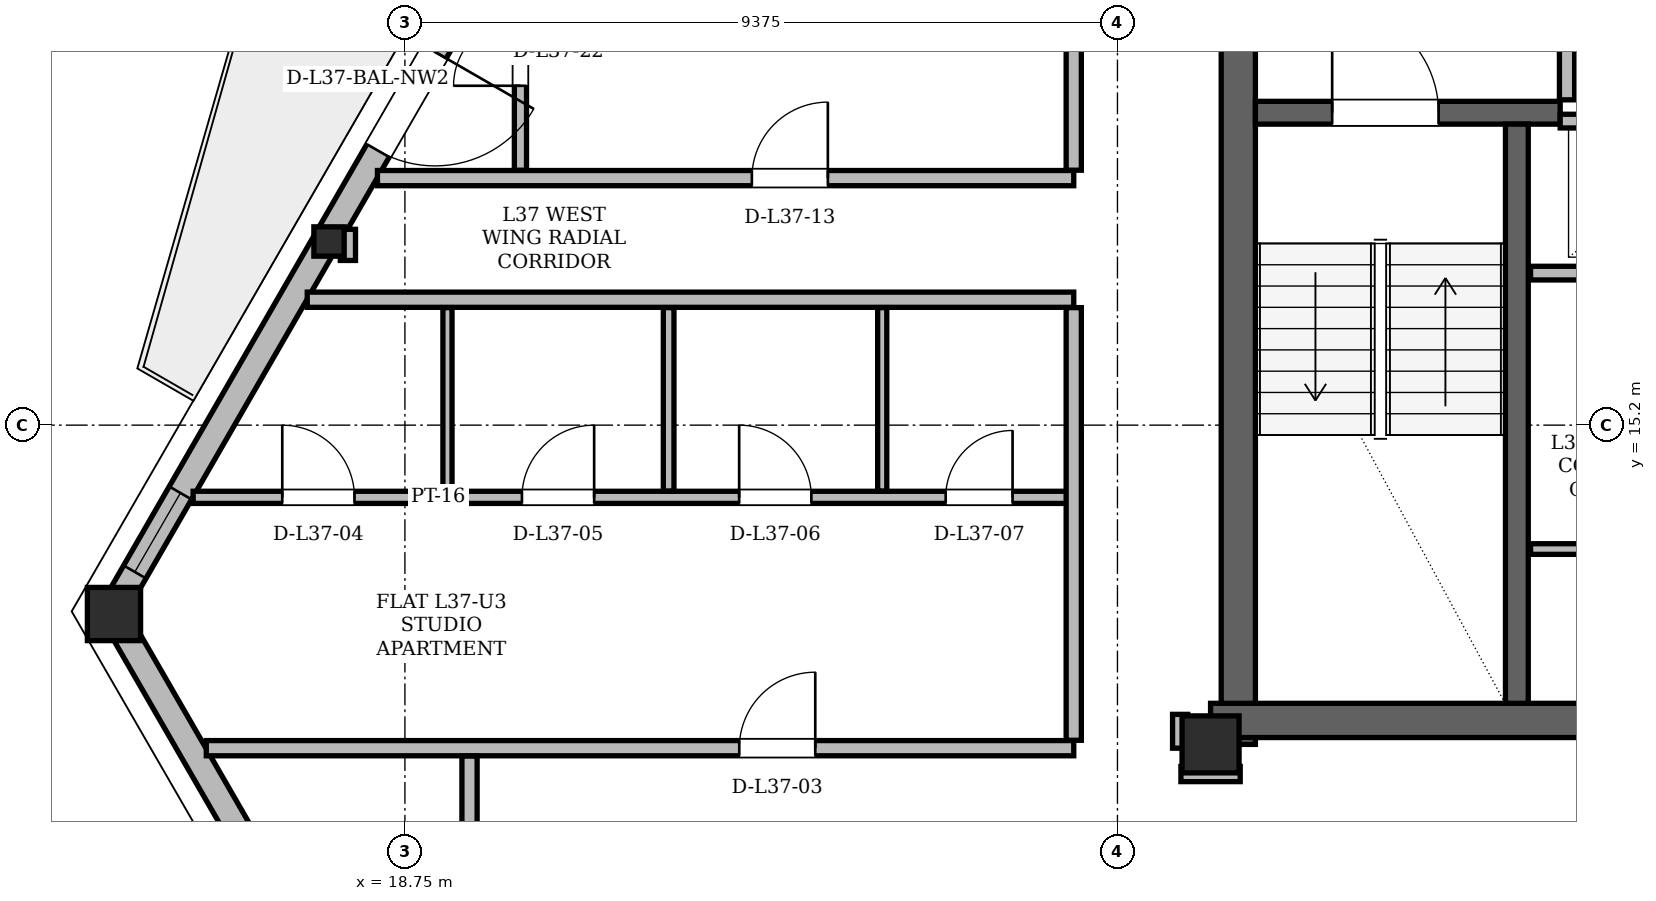
"""IFC4 building model, lengths in metres.
Left out: names, types, materials, properties, quantities, classifications, styles, units other than length and angle.
Written with IfcOpenShell. Run it as: python <this file> out.ifc"""

import sys

from ifc_helpers import new_model, si_unit, direction, frame, frame_2d, origin, origin_2d, place, context, subcontext, project, spatial, rectangle, hollow_rectangle, i_section, extrude, element, fill, save


model = new_model("IFC4")
c1 = context("Model", 3, precision=1e-05, world=origin(), true_north=direction((0.0, 1.0)))
c2 = subcontext(c1, "Body", "Model", "MODEL_VIEW")
j1 = project(units=[si_unit("LENGTHUNIT", "METRE"), si_unit("PLANEANGLEUNIT", "RADIAN")], contexts=[c1])
p1 = place(None, origin())
s1 = spatial("IfcSite", under=j1, at=p1, CompositionType="ELEMENT")
p2 = place(p1, origin())
s2 = spatial("IfcBuilding", under=s1, at=p2, CompositionType="ELEMENT")
p3 = place(p2, frame((0.0, 0.0, 142.2)))
s3 = spatial("IfcBuildingStorey", under=s2, at=p3, CompositionType="ELEMENT", Elevation=142.2)
p4 = place(p3, frame((29.35, 11.0, 0.0), z_axis=(0.0, 0.0, 1.0), x_axis=(1.0, 0.0, 0.0)))
e1 = element("IfcColumn", 1, at=p4, inside=s3, PredefinedType="COLUMN", context=c2, shape_type="SweptSolid", body=[
    extrude(hollow_rectangle(XDim=0.75, YDim=0.75, WallThickness=0.06, at=origin_2d()), origin(), (0.0, 0.0, 1.0), 3.6),
])
p5 = place(p3, frame((14.897, 12.75, 0.005), z_axis=(0.014137914748, -0.01930369129, 0.999713702451), x_axis=(0.806766093747, 0.590870941899, 0.0)))
e2 = element("IfcColumn", 2, at=p5, inside=s3, PredefinedType="COLUMN", context=c2, shape_type="SweptSolid", body=[
    extrude(hollow_rectangle(XDim=0.7, YDim=0.7, WallThickness=0.055, at=origin_2d()), origin(), (0.0, 0.0, 1.0), 3.592),
])
p6 = place(p3, frame((17.723, 17.646, 0.005), z_axis=(0.015701641679, -0.016585283852, 0.999739159385), x_axis=(0.72618726002, 0.687496955183, 0.0)))
e3 = element("IfcColumn", 3, at=p6, inside=s3, PredefinedType="COLUMN", context=c2, shape_type="SweptSolid", body=[
    extrude(i_section(OverallWidth=0.399, OverallDepth=0.386, WebThickness=0.021, FlangeThickness=0.033, at=origin_2d()), origin(), (0.0, 0.0, 1.0), 3.592),
])
p7 = place(p3, frame((29.715, 11.0, 0.0), z_axis=(0.0, 0.0, 1.0), x_axis=(0.0, 1.0, 0.0)))
e4 = element("IfcWall", 4, at=p7, inside=s3, PredefinedType="SHEAR", context=c2, shape_type="SweptSolid", body=[
    extrude(rectangle(XDim=13.3, YDim=0.45, at=frame_2d((6.65, 0.0))), origin(), (0.0, 0.0, 1.0), 3.36),
])
p8 = place(p3, frame((29.35, 11.315, 0.0), z_axis=(0.0, 0.0, 1.0), x_axis=(1.0, 0.0, 0.0)))
e5 = element("IfcWall", 5, at=p8, inside=s3, PredefinedType="SHEAR", context=c2, shape_type="SweptSolid", body=[
    extrude(rectangle(XDim=7.1, YDim=0.45, at=frame_2d((3.55, 0.0))), origin(), (0.0, 0.0, 1.0), 3.36),
])
p9 = place(p3, frame((29.94, 19.31, 0.0), z_axis=(0.0, 0.0, 1.0), x_axis=(1.0, 0.0, 0.0)))
e6 = element("IfcWall", 6, at=p9, inside=s3, PredefinedType="SHEAR", context=c2, shape_type="SweptSolid", body=[
    extrude(rectangle(XDim=4.01, YDim=0.3, at=frame_2d((2.005, 0.0))), origin(), (0.0, 0.0, 1.0), 3.36),
])
p10 = place(p9, frame((1.01, 0.0, 0.0)))
e7 = element("IfcOpeningElement", 7, at=p10, cuts=e6, PredefinedType="OPENING", context=c2, shape_type="SweptSolid", body=[
    extrude(rectangle(XDim=1.4, YDim=2.2, at=frame_2d((0.7, 1.1))), frame((0.0, 0.15, 0.0), z_axis=(0.0, -1.0, 0.0), x_axis=(1.0, 0.0, 0.0)), (0.0, 0.0, 1.0), 0.3),
])
p11 = place(p3, frame((33.38, 11.54, 0.0), z_axis=(0.0, 0.0, 1.0), x_axis=(0.0, 1.0, 0.0)))
e8 = element("IfcWall", 8, at=p11, inside=s3, PredefinedType="SHEAR", context=c2, shape_type="SweptSolid", body=[
    extrude(rectangle(XDim=7.62, YDim=0.3, at=frame_2d((3.81, 0.0))), origin(), (0.0, 0.0, 1.0), 3.36),
])
p12 = place(p3, frame((14.897, 12.75, 0.0), z_axis=(0.0, 0.0, 1.0), x_axis=(0.500014298586, -0.866017148335, 0.0)))
e9 = element("IfcWall", 9, at=p12, inside=s3, PredefinedType="SOLIDWALL", context=c2, shape_type="SweptSolid", body=[
    extrude(rectangle(XDim=9.872, YDim=0.34, at=frame_2d((4.936, 0.0))), origin(), (0.0, 0.0, 1.0), 2.58),
])
p13 = place(p3, frame((32.564, 43.35, 0.0), z_axis=(0.0, 0.0, 1.0), x_axis=(-0.500002563111, -0.866023923966, 0.0)))
e10 = element("IfcWall", 10, at=p13, inside=s3, PredefinedType="SOLIDWALL", context=c2, shape_type="SweptSolid", body=[
    extrude(rectangle(XDim=35.334, YDim=0.34, at=frame_2d((17.667, 0.0))), origin(), (0.0, 0.0, 1.0), 2.58),
])
p14 = place(p13, frame((8.034, 0.0, 0.0)))
e11 = element("IfcOpeningElement", 11, at=p14, cuts=e10, PredefinedType="OPENING", context=c2, shape_type="SweptSolid", body=[
    extrude(rectangle(XDim=1.5, YDim=2.2, at=frame_2d((0.75, 1.1))), frame((0.0, 0.17, 0.0), z_axis=(0.0, -1.0, 0.0), x_axis=(1.0, 0.0, 0.0)), (0.0, 0.0, 1.0), 0.34),
])
p15 = place(p13, frame((26.835, 0.0, 0.0)))
e12 = element("IfcOpeningElement", 12, at=p15, cuts=e10, PredefinedType="OPENING", context=c2, shape_type="SweptSolid", body=[
    extrude(rectangle(XDim=1.5, YDim=2.2, at=frame_2d((0.75, 1.1))), frame((0.0, 0.17, 0.0), z_axis=(0.0, -1.0, 0.0), x_axis=(1.0, 0.0, 0.0)), (0.0, 0.0, 1.0), 0.34),
])
p16 = place(p13, frame((22.185, 0.0, 0.85)))
e13 = element("IfcOpeningElement", 13, at=p16, cuts=e10, PredefinedType="OPENING", context=c2, shape_type="SweptSolid", body=[
    extrude(rectangle(XDim=1.2, YDim=1.48, at=frame_2d((0.6, 0.74))), frame((0.0, 0.17, 0.0), z_axis=(0.0, -1.0, 0.0), x_axis=(1.0, 0.0, 0.0)), (0.0, 0.0, 1.0), 0.34),
])
p17 = place(p13, frame((2.318, 0.0, 0.85)))
e14 = element("IfcOpeningElement", 14, at=p17, cuts=e10, PredefinedType="OPENING", context=c2, shape_type="SweptSolid", body=[
    extrude(rectangle(XDim=1.6, YDim=1.62, at=frame_2d((0.8, 0.81))), frame((0.0, 0.17, 0.0), z_axis=(0.0, -1.0, 0.0), x_axis=(1.0, 0.0, 0.0)), (0.0, 0.0, 1.0), 0.34),
])
p18 = place(p13, frame((12.959, 0.0, 0.85)))
e15 = element("IfcOpeningElement", 15, at=p18, cuts=e10, PredefinedType="OPENING", context=c2, shape_type="SweptSolid", body=[
    extrude(rectangle(XDim=3.0, YDim=1.62, at=frame_2d((1.5, 0.81))), frame((0.0, 0.17, 0.0), z_axis=(0.0, -1.0, 0.0), x_axis=(1.0, 0.0, 0.0)), (0.0, 0.0, 1.0), 0.34),
])
p19 = place(p13, frame((20.293, 0.0, 0.85)))
e16 = element("IfcOpeningElement", 16, at=p19, cuts=e10, PredefinedType="OPENING", context=c2, shape_type="SweptSolid", body=[
    extrude(rectangle(XDim=1.2, YDim=1.48, at=frame_2d((0.6, 0.74))), frame((0.0, 0.17, 0.0), z_axis=(0.0, -1.0, 0.0), x_axis=(1.0, 0.0, 0.0)), (0.0, 0.0, 1.0), 0.34),
])
p20 = place(p13, frame((33.535, 0.0, 0.85)))
e17 = element("IfcOpeningElement", 17, at=p20, cuts=e10, PredefinedType="OPENING", context=c2, shape_type="SweptSolid", body=[
    extrude(rectangle(XDim=1.2, YDim=1.48, at=frame_2d((0.6, 0.74))), frame((0.0, 0.17, 0.0), z_axis=(0.0, -1.0, 0.0), x_axis=(1.0, 0.0, 0.0)), (0.0, 0.0, 1.0), 0.34),
])
p21 = place(p3, frame((34.04, 19.48, 0.0), z_axis=(0.0, 0.0, 1.0), x_axis=(0.0, 1.0, 0.0)))
e18 = element("IfcWall", 18, at=p21, inside=s3, PredefinedType="PARTITIONING", context=c2, shape_type="SweptSolid", body=[
    extrude(rectangle(XDim=4.5, YDim=0.2, at=frame_2d((2.25, 0.0))), origin(), (0.0, 0.0, 1.0), 2.4),
])
p22 = place(p21, frame((2.12, 0.0, 0.0)))
e19 = element("IfcOpeningElement", 19, at=p22, cuts=e18, PredefinedType="OPENING", context=c2, shape_type="SweptSolid", body=[
    extrude(rectangle(XDim=1.1, YDim=2.2, at=frame_2d((0.55, 1.1))), frame((0.0, 0.1, 0.0), z_axis=(0.0, -1.0, 0.0), x_axis=(1.0, 0.0, 0.0)), (0.0, 0.0, 1.0), 0.2),
])
p23 = place(p3, frame((33.95, 19.2, 0.0), z_axis=(0.0, 0.0, 1.0), x_axis=(1.0, 0.0, 0.0)))
e20 = element("IfcWall", 20, at=p23, inside=s3, PredefinedType="PARTITIONING", context=c2, shape_type="SweptSolid", body=[
    extrude(rectangle(XDim=2.27, YDim=0.18, at=frame_2d((1.135, 0.0))), origin(), (0.0, 0.0, 1.0), 3.36),
])
p24 = place(p3, frame((33.56, 17.2, 0.0), z_axis=(0.0, 0.0, 1.0), x_axis=(1.0, 0.0, 0.0)))
e21 = element("IfcWall", 21, at=p24, inside=s3, PredefinedType="PARTITIONING", context=c2, shape_type="SweptSolid", body=[
    extrude(rectangle(XDim=2.66, YDim=0.18, at=frame_2d((1.33, 0.0))), origin(), (0.0, 0.0, 1.0), 3.36),
])
p25 = place(p3, frame((33.56, 13.57, 0.0), z_axis=(0.0, 0.0, 1.0), x_axis=(1.0, 0.0, 0.0)))
e22 = element("IfcWall", 22, at=p25, inside=s3, PredefinedType="PARTITIONING", context=c2, shape_type="SweptSolid", body=[
    extrude(rectangle(XDim=2.66, YDim=0.14, at=frame_2d((1.33, 0.0))), origin(), (0.0, 0.0, 1.0), 3.36),
])
p26 = place(p3, frame((28.96, 10.61, 0.0), z_axis=(0.0, 0.0, 1.0), x_axis=(1.0, 0.0, 0.0)))
e23 = element("IfcWall", 23, at=p26, inside=s3, PredefinedType="PARTITIONING", context=c2, shape_type="SweptSolid", body=[
    extrude(rectangle(XDim=0.78, YDim=0.2, at=frame_2d((0.39, 0.0))), origin(), (0.0, 0.0, 1.0), 2.4),
])
p27 = place(p3, frame((16.137, 10.95, 0.0), z_axis=(0.0, 0.0, 1.0), x_axis=(1.0, 0.0, 0.0)))
e24 = element("IfcWall", 24, at=p27, inside=s3, PredefinedType="PARTITIONING", context=c2, shape_type="SweptSolid", body=[
    extrude(rectangle(XDim=11.413, YDim=0.2, at=frame_2d((5.707, 0.0))), origin(), (0.0, 0.0, 1.0), 3.36),
])
p28 = place(p27, frame((7.012, 0.0, 0.0)))
e25 = element("IfcOpeningElement", 25, at=p28, cuts=e24, PredefinedType="OPENING", context=c2, shape_type="SweptSolid", body=[
    extrude(rectangle(XDim=1.0, YDim=2.18, at=frame_2d((0.5, 1.09))), frame((0.0, 0.1, 0.0), z_axis=(0.0, -1.0, 0.0), x_axis=(1.0, 0.0, 0.0)), (0.0, 0.0, 1.0), 0.2),
])
p29 = place(p3, frame((15.964, 14.25, 0.0), z_axis=(0.0, 0.0, 1.0), x_axis=(1.0, 0.0, 0.0)))
e26 = element("IfcWall", 26, at=p29, inside=s3, PredefinedType="PARTITIONING", context=c2, shape_type="SweptSolid", body=[
    extrude(rectangle(XDim=11.636, YDim=0.16, at=frame_2d((5.818, 0.0))), origin(), (0.0, 0.0, 1.0), 3.36),
])
p30 = place(p29, frame((1.173, 0.0, 0.0)))
e27 = element("IfcOpeningElement", 27, at=p30, cuts=e26, PredefinedType="OPENING", context=c2, shape_type="SweptSolid", body=[
    extrude(rectangle(XDim=0.95, YDim=2.1, at=frame_2d((0.475, 1.05))), frame((0.0, 0.08, 0.0), z_axis=(0.0, -1.0, 0.0), x_axis=(1.0, 0.0, 0.0)), (0.0, 0.0, 1.0), 0.16),
])
p31 = place(p29, frame((4.326, 0.0, 0.0)))
e28 = element("IfcOpeningElement", 28, at=p31, cuts=e26, PredefinedType="OPENING", context=c2, shape_type="SweptSolid", body=[
    extrude(rectangle(XDim=0.95, YDim=2.1, at=frame_2d((0.475, 1.05))), frame((0.0, 0.08, 0.0), z_axis=(0.0, -1.0, 0.0), x_axis=(1.0, 0.0, 0.0)), (0.0, 0.0, 1.0), 0.16),
])
p32 = place(p29, frame((7.184, 0.0, 0.0)))
e29 = element("IfcOpeningElement", 29, at=p32, cuts=e26, PredefinedType="OPENING", context=c2, shape_type="SweptSolid", body=[
    extrude(rectangle(XDim=0.95, YDim=2.1, at=frame_2d((0.475, 1.05))), frame((0.0, 0.08, 0.0), z_axis=(0.0, -1.0, 0.0), x_axis=(1.0, 0.0, 0.0)), (0.0, 0.0, 1.0), 0.16),
])
p33 = place(p29, frame((9.901, 0.0, 0.0)))
e30 = element("IfcOpeningElement", 30, at=p33, cuts=e26, PredefinedType="OPENING", context=c2, shape_type="SweptSolid", body=[
    extrude(rectangle(XDim=0.88, YDim=2.08, at=frame_2d((0.44, 1.04))), frame((0.0, 0.08, 0.0), z_axis=(0.0, -1.0, 0.0), x_axis=(1.0, 0.0, 0.0)), (0.0, 0.0, 1.0), 0.16),
])
p34 = place(p3, frame((17.465, 16.85, 0.0), z_axis=(0.0, 0.0, 1.0), x_axis=(1.0, 0.0, 0.0)))
e31 = element("IfcWall", 31, at=p34, inside=s3, PredefinedType="PARTITIONING", context=c2, shape_type="SweptSolid", body=[
    extrude(rectangle(XDim=10.085, YDim=0.2, at=frame_2d((5.042, 0.0))), origin(), (0.0, 0.0, 1.0), 3.36),
])
p35 = place(p3, frame((18.389, 18.45, 0.0), z_axis=(0.0, 0.0, 1.0), x_axis=(1.0, 0.0, 0.0)))
e32 = element("IfcWall", 32, at=p35, inside=s3, PredefinedType="PARTITIONING", context=c2, shape_type="SweptSolid", body=[
    extrude(rectangle(XDim=9.161, YDim=0.2, at=frame_2d((4.581, 0.0))), origin(), (0.0, 0.0, 1.0), 3.36),
])
p36 = place(p35, frame((4.926, 0.0, 0.0)))
e33 = element("IfcOpeningElement", 33, at=p36, cuts=e32, PredefinedType="OPENING", context=c2, shape_type="SweptSolid", body=[
    extrude(rectangle(XDim=1.0, YDim=2.18, at=frame_2d((0.5, 1.09))), frame((0.0, 0.1, 0.0), z_axis=(0.0, -1.0, 0.0), x_axis=(1.0, 0.0, 0.0)), (0.0, 0.0, 1.0), 0.2),
])
p37 = place(p3, frame((18.0, 17.367, 0.0), z_axis=(0.0, 0.0, 1.0), x_axis=(0.0, 1.0, 0.0)))
e34 = element("IfcWall", 34, at=p37, inside=s3, PredefinedType="PARTITIONING", context=c2, shape_type="SweptSolid", body=[
    extrude(rectangle(XDim=0.41, YDim=0.2, at=frame_2d((0.205, 0.0))), origin(), (0.0, 0.0, 1.0), 3.36),
])
p38 = place(p3, frame((19.31, 14.334, 0.0), z_axis=(0.0, 0.0, 1.0), x_axis=(0.0, 1.0, 0.0)))
e35 = element("IfcWall", 35, at=p38, inside=s3, PredefinedType="PARTITIONING", context=c2, shape_type="SweptSolid", body=[
    extrude(rectangle(XDim=2.412, YDim=0.12, at=frame_2d((1.206, 0.0))), origin(), (0.0, 0.0, 1.0), 3.36),
])
p39 = place(p3, frame((19.6, 9.404, 0.0), z_axis=(0.0, 0.0, 1.0), x_axis=(0.0, 1.0, 0.0)))
e36 = element("IfcWall", 36, at=p39, inside=s3, PredefinedType="PARTITIONING", context=c2, shape_type="SweptSolid", body=[
    extrude(rectangle(XDim=1.442, YDim=0.2, at=frame_2d((0.721, 0.0))), origin(), (0.0, 0.0, 1.0), 3.36),
])
p40 = place(p3, frame((20.27, 18.554, 0.0), z_axis=(0.0, 0.0, 1.0), x_axis=(0.0, 1.0, 0.0)))
e37 = element("IfcWall", 37, at=p40, inside=s3, PredefinedType="PARTITIONING", context=c2, shape_type="SweptSolid", body=[
    extrude(rectangle(XDim=3.136, YDim=0.16, at=frame_2d((1.568, 0.0))), origin(), (0.0, 0.0, 1.0), 3.36),
])
p41 = place(p40, frame((1.111, 0.0, 0.0)))
e38 = element("IfcOpeningElement", 38, at=p41, cuts=e37, PredefinedType="OPENING", context=c2, shape_type="SweptSolid", body=[
    extrude(rectangle(XDim=0.88, YDim=2.08, at=frame_2d((0.44, 1.04))), frame((0.0, 0.08, 0.0), z_axis=(0.0, -1.0, 0.0), x_axis=(1.0, 0.0, 0.0)), (0.0, 0.0, 1.0), 0.16),
])
p42 = place(p3, frame((22.22, 14.334, 0.0), z_axis=(0.0, 0.0, 1.0), x_axis=(0.0, 1.0, 0.0)))
e39 = element("IfcWall", 39, at=p42, inside=s3, PredefinedType="PARTITIONING", context=c2, shape_type="SweptSolid", body=[
    extrude(rectangle(XDim=2.412, YDim=0.14, at=frame_2d((1.206, 0.0))), origin(), (0.0, 0.0, 1.0), 3.36),
])
p43 = place(p3, frame((25.03, 14.334, 0.0), z_axis=(0.0, 0.0, 1.0), x_axis=(0.0, 1.0, 0.0)))
e40 = element("IfcWall", 40, at=p43, inside=s3, PredefinedType="PARTITIONING", context=c2, shape_type="SweptSolid", body=[
    extrude(rectangle(XDim=2.412, YDim=0.12, at=frame_2d((1.206, 0.0))), origin(), (0.0, 0.0, 1.0), 3.36),
])
p44 = place(p3, frame((27.55, 11.054, 0.0), z_axis=(0.0, 0.0, 1.0), x_axis=(0.0, 1.0, 0.0)))
e41 = element("IfcWall", 41, at=p44, inside=s3, PredefinedType="PARTITIONING", context=c2, shape_type="SweptSolid", body=[
    extrude(rectangle(XDim=5.692, YDim=0.2, at=frame_2d((2.846, 0.0))), origin(), (0.0, 0.0, 1.0), 2.822),
])
p45 = place(p3, frame((27.55, 18.554, 0.0), z_axis=(0.0, 0.0, 1.0), x_axis=(0.0, 1.0, 0.0)))
e42 = element("IfcWall", 42, at=p45, inside=s3, PredefinedType="PARTITIONING", context=c2, shape_type="SweptSolid", body=[
    extrude(rectangle(XDim=7.312, YDim=0.2, at=frame_2d((3.656, 0.0))), origin(), (0.0, 0.0, 1.0), 3.36),
])
p46 = place(p3, frame((28.95, 10.95, 0.0), z_axis=(0.0, 0.0, 1.0), x_axis=(0.0, 1.0, 0.0)))
e43 = element("IfcWall", 43, at=p46, inside=s3, PredefinedType="PARTITIONING", context=c2, shape_type="SweptSolid", body=[
    extrude(rectangle(XDim=0.445, YDim=0.2, at=frame_2d((0.223, 0.0))), origin(), (0.0, 0.0, 1.0), 2.822),
])
p47 = place(p15, origin())
e44 = element("IfcDoor", 44, at=p47, inside=s3, OperationType="SINGLE_SWING_LEFT", PredefinedType="DOOR", context=c2, shape_type="SweptSolid", body=[
    extrude(rectangle(XDim=1.5, YDim=2.2, at=frame_2d((0.75, 1.1))), frame((0.0, 0.025, 0.0), z_axis=(0.0, -1.0, 0.0), x_axis=(1.0, 0.0, 0.0)), (0.0, 0.0, 1.0), 0.05),
])
fill(e12, e44)
p48 = place(p20, origin())
e45 = element("IfcWindow", 45, at=p48, inside=s3, PartitioningType="SINGLE_PANEL", PredefinedType="WINDOW", context=c2, shape_type="SweptSolid", body=[
    extrude(rectangle(XDim=1.2, YDim=1.48, at=frame_2d((0.6, 0.74))), frame((0.0, 0.03, 0.0), z_axis=(0.0, -1.0, 0.0), x_axis=(1.0, 0.0, 0.0)), (0.0, 0.0, 1.0), 0.06),
])
fill(e17, e45)
p49 = place(p10, origin())
e46 = element("IfcDoor", 46, at=p49, inside=s3, OperationType="SINGLE_SWING_LEFT", PredefinedType="DOOR", context=c2, shape_type="SweptSolid", body=[
    extrude(rectangle(XDim=1.4, YDim=2.2, at=frame_2d((0.7, 1.1))), frame((0.0, 0.025, 0.0), z_axis=(0.0, -1.0, 0.0), x_axis=(1.0, 0.0, 0.0)), (0.0, 0.0, 1.0), 0.05),
])
fill(e7, e46)
p50 = place(p28, origin())
e47 = element("IfcDoor", 47, at=p50, inside=s3, OperationType="SINGLE_SWING_RIGHT", PredefinedType="DOOR", context=c2, shape_type="SweptSolid", body=[
    extrude(rectangle(XDim=1.0, YDim=2.18, at=frame_2d((0.5, 1.09))), frame((0.0, 0.025, 0.0), z_axis=(0.0, -1.0, 0.0), x_axis=(1.0, 0.0, 0.0)), (0.0, 0.0, 1.0), 0.05),
])
fill(e25, e47)
p51 = place(p30, origin())
e48 = element("IfcDoor", 48, at=p51, inside=s3, OperationType="SINGLE_SWING_LEFT", PredefinedType="DOOR", context=c2, shape_type="SweptSolid", body=[
    extrude(rectangle(XDim=0.95, YDim=2.1, at=frame_2d((0.475, 1.05))), frame((0.0, 0.025, 0.0), z_axis=(0.0, -1.0, 0.0), x_axis=(1.0, 0.0, 0.0)), (0.0, 0.0, 1.0), 0.05),
])
fill(e27, e48)
p52 = place(p31, origin())
e49 = element("IfcDoor", 49, at=p52, inside=s3, OperationType="SINGLE_SWING_RIGHT", PredefinedType="DOOR", context=c2, shape_type="SweptSolid", body=[
    extrude(rectangle(XDim=0.95, YDim=2.1, at=frame_2d((0.475, 1.05))), frame((0.0, 0.025, 0.0), z_axis=(0.0, -1.0, 0.0), x_axis=(1.0, 0.0, 0.0)), (0.0, 0.0, 1.0), 0.05),
])
fill(e28, e49)
p53 = place(p32, origin())
e50 = element("IfcDoor", 50, at=p53, inside=s3, OperationType="SINGLE_SWING_LEFT", PredefinedType="DOOR", context=c2, shape_type="SweptSolid", body=[
    extrude(rectangle(XDim=0.95, YDim=2.1, at=frame_2d((0.475, 1.05))), frame((0.0, 0.025, 0.0), z_axis=(0.0, -1.0, 0.0), x_axis=(1.0, 0.0, 0.0)), (0.0, 0.0, 1.0), 0.05),
])
fill(e29, e50)
p54 = place(p33, origin())
e51 = element("IfcDoor", 51, at=p54, inside=s3, OperationType="SINGLE_SWING_RIGHT", PredefinedType="DOOR", context=c2, shape_type="SweptSolid", body=[
    extrude(rectangle(XDim=0.88, YDim=2.08, at=frame_2d((0.44, 1.04))), frame((0.0, 0.025, 0.0), z_axis=(0.0, -1.0, 0.0), x_axis=(1.0, 0.0, 0.0)), (0.0, 0.0, 1.0), 0.05),
])
fill(e30, e51)
p55 = place(p36, origin())
e52 = element("IfcDoor", 52, at=p55, inside=s3, OperationType="SINGLE_SWING_RIGHT", PredefinedType="DOOR", context=c2, shape_type="SweptSolid", body=[
    extrude(rectangle(XDim=1.0, YDim=2.18, at=frame_2d((0.5, 1.09))), frame((0.0, 0.025, 0.0), z_axis=(0.0, -1.0, 0.0), x_axis=(1.0, 0.0, 0.0)), (0.0, 0.0, 1.0), 0.05),
])
fill(e33, e52)
p56 = place(p41, origin())
e53 = element("IfcDoor", 53, at=p56, inside=s3, OperationType="SINGLE_SWING_LEFT", PredefinedType="DOOR", context=c2, shape_type="SweptSolid", body=[
    extrude(rectangle(XDim=0.88, YDim=2.08, at=frame_2d((0.44, 1.04))), frame((0.0, 0.025, 0.0), z_axis=(0.0, -1.0, 0.0), x_axis=(1.0, 0.0, 0.0)), (0.0, 0.0, 1.0), 0.05),
])
fill(e38, e53)
save(model, sys.argv[1])
